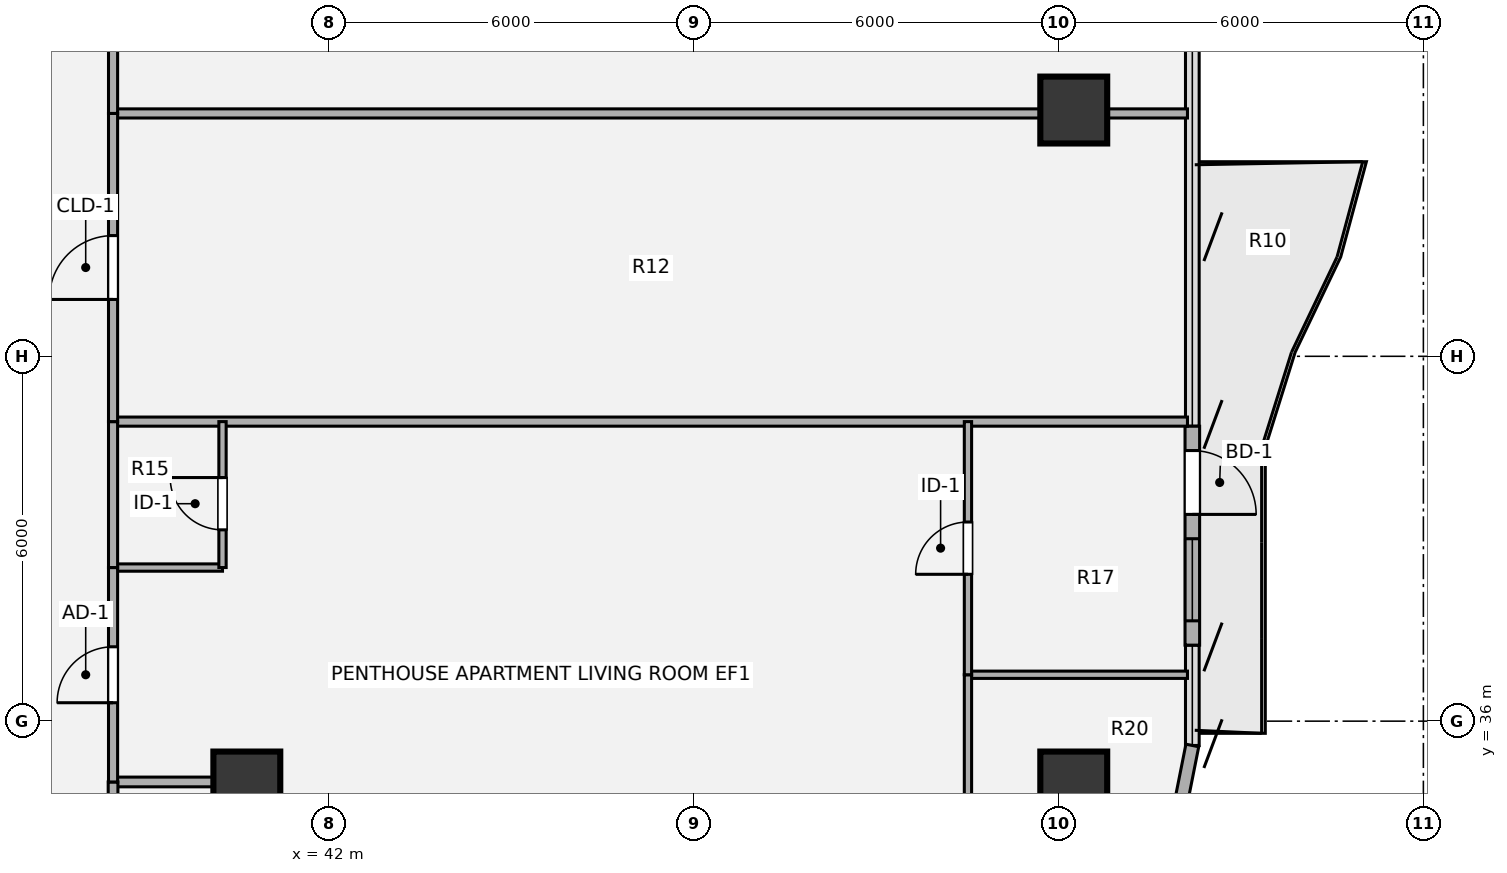
"""IFC4 building model, lengths in metres.
Left out: names, types, materials, properties, quantities, classifications, styles, units other than length and angle.
Written with IfcOpenShell. Run it as: python <this file> out.ifc"""

import sys

from ifc_helpers import new_model, si_unit, direction, frame, frame_2d, origin, origin_2d, place, context, subcontext, project, spatial, rectangle, hollow_circle, extrude, source, transform, mapped, element, fill, save


model = new_model("IFC4")
c1 = context("Model", 3, precision=1e-05, world=origin(), true_north=direction((0.0, 1.0)))
c2 = subcontext(c1, "Body", "Model", "MODEL_VIEW")
j1 = project(units=[si_unit("LENGTHUNIT", "METRE"), si_unit("PLANEANGLEUNIT", "RADIAN")], contexts=[c1])
p1 = place(None, origin())
s1 = spatial("IfcSite", under=j1, at=p1, CompositionType="ELEMENT")
p2 = place(p1, origin())
s2 = spatial("IfcBuilding", under=s1, at=p2, CompositionType="ELEMENT")
p3 = place(p2, frame((0.0, 0.0, 205.56)))
s3 = spatial("IfcBuildingStorey", under=s2, at=p3, CompositionType="ELEMENT", Elevation=205.56)
m1 = source(origin(), c2, "Body", "SweptSolid", [
    extrude(hollow_circle(Radius=0.55, WallThickness=0.04, at=origin_2d()), origin(), (0.0, 0.0, 1.0), 3.78),
])
for number, where, z_axis, x_axis in (
    (1, (54.25, 34.95, 0.0), (0.0, 0.0, 1.0), (1.0, 0.0, 0.0)),
    (2, (54.25, 46.05, 0.0), (0.0, 0.0, 1.0), (1.0, 0.0, 0.0)),
    (3, (40.65, 34.95, 0.0), (0.0, 0.0, 1.0), (1.0, 0.0, 0.0)),
):
    element("IfcColumn", number, at=place(p3, frame(where, z_axis=z_axis, x_axis=x_axis)), inside=s3, PredefinedType="COLUMN", context=c2, shape_type="MappedRepresentation", body=[
        mapped(m1, transform((0.0, 0.0, 0.0), x_axis=(1.0, 0.0, 0.0), y_axis=(0.0, 1.0, 0.0), z_axis=(0.0, 0.0, 1.0), scale=1.0)),
    ])
p4 = place(p3, frame((56.2, 40.85, 0.0), z_axis=(0.0, 0.0, 1.0), x_axis=(0.0, -1.0, 0.0)))
e4 = element("IfcWall", 4, at=p4, inside=s3, PredefinedType="SOLIDWALL", context=c2, shape_type="SweptSolid", body=[
    extrude(rectangle(XDim=3.6, YDim=0.24, at=frame_2d((1.8, 0.0))), origin(), (0.0, 0.0, 1.0), 3.53),
])
p5 = place(p4, frame((0.4, 0.0, 0.0)))
e5 = element("IfcOpeningElement", 5, at=p5, cuts=e4, PredefinedType="OPENING", context=c2, shape_type="SweptSolid", body=[
    extrude(rectangle(XDim=1.05, YDim=2.15, at=origin_2d()), frame((0.525, 0.13, 1.075), z_axis=(0.0, -1.0, 0.0), x_axis=(1.0, 0.0, 0.0)), (0.0, 0.0, 1.0), 0.26),
])
p6 = place(p4, frame((1.85, 0.0, 0.85)))
e6 = element("IfcOpeningElement", 6, at=p6, cuts=e4, PredefinedType="OPENING", context=c2, shape_type="SweptSolid", body=[
    extrude(rectangle(XDim=1.35, YDim=1.35, at=origin_2d()), frame((0.675, 0.13, 0.675), z_axis=(0.0, -1.0, 0.0), x_axis=(1.0, 0.0, 0.0)), (0.0, 0.0, 1.0), 0.26),
])
p7 = place(p3, frame((56.2, 35.6, 0.0), z_axis=(0.0, 0.0, 1.0), x_axis=(-0.195138390419, -0.980775717779, 0.0)))
e7 = element("IfcWall", 7, at=p7, inside=s3, PredefinedType="SOLIDWALL", context=c2, shape_type="SweptSolid", body=[
    extrude(rectangle(XDim=1.249, YDim=0.215, at=frame_2d((0.624, 0.0))), origin(), (0.0, 0.0, 1.0), 3.53),
])
p8 = place(p3, frame((38.45, 35.0, 0.0), z_axis=(0.0, 0.0, 1.0), x_axis=(1.0, 0.0, 0.0)))
e8 = element("IfcWall", 8, at=p8, inside=s3, PredefinedType="PLUMBINGWALL", context=c2, shape_type="SweptSolid", body=[
    extrude(rectangle(XDim=1.8, YDim=0.16, at=frame_2d((0.9, 0.0))), origin(), (0.0, 0.0, 1.0), 2.903),
])
p9 = place(p3, frame((52.51, 36.763, 0.0), z_axis=(0.0, 0.0, 1.0), x_axis=(1.0, 0.0, 0.0)))
e9 = element("IfcWall", 9, at=p9, inside=s3, PredefinedType="PARTITIONING", context=c2, shape_type="SweptSolid", body=[
    extrude(rectangle(XDim=3.61, YDim=0.12, at=frame_2d((1.805, 0.0))), origin(), (0.0, 0.0, 1.0), 2.982),
])
p10 = place(p3, frame((38.45, 38.526, 0.0), z_axis=(0.0, 0.0, 1.0), x_axis=(1.0, 0.0, 0.0)))
e10 = element("IfcWall", 10, at=p10, inside=s3, PredefinedType="PARTITIONING", context=c2, shape_type="SweptSolid", body=[
    extrude(rectangle(XDim=1.8, YDim=0.12, at=frame_2d((0.9, 0.0))), origin(), (0.0, 0.0, 1.0), 3.259),
])
p11 = place(p3, frame((38.45, 40.926, 0.0), z_axis=(0.0, 0.0, 1.0), x_axis=(1.0, 0.0, 0.0)))
e11 = element("IfcWall", 11, at=p11, inside=s3, PredefinedType="PARTITIONING", context=c2, shape_type="SweptSolid", body=[
    extrude(rectangle(XDim=17.67, YDim=0.15, at=frame_2d((8.835, 0.0))), origin(), (0.0, 0.0, 1.0), 2.982),
])
p12 = place(p3, frame((38.45, 45.994, 0.0), z_axis=(0.0, 0.0, 1.0), x_axis=(1.0, 0.0, 0.0)))
e12 = element("IfcWall", 12, at=p12, inside=s3, PredefinedType="PARTITIONING", context=c2, shape_type="SweptSolid", body=[
    extrude(rectangle(XDim=17.67, YDim=0.15, at=frame_2d((8.835, 0.0))), origin(), (0.0, 0.0, 1.0), 2.903),
])
p13 = place(p3, frame((38.45, 32.6, 0.0), z_axis=(0.0, 0.0, 1.0), x_axis=(0.0, 1.0, 0.0)))
e13 = element("IfcWall", 13, at=p13, inside=s3, PredefinedType="PLUMBINGWALL", context=c2, shape_type="SweptSolid", body=[
    extrude(rectangle(XDim=2.4, YDim=0.16, at=frame_2d((1.2, 0.0))), origin(), (0.0, 0.0, 1.0), 3.5),
])
p14 = place(p3, frame((38.45, 35.0, 0.0), z_axis=(0.0, 0.0, 1.0), x_axis=(0.0, 1.0, 0.0)))
e14 = element("IfcWall", 14, at=p14, inside=s3, PredefinedType="PARTITIONING", context=c2, shape_type="SweptSolid", body=[
    extrude(rectangle(XDim=3.526, YDim=0.15, at=frame_2d((1.763, 0.0))), origin(), (0.0, 0.0, 1.0), 3.5),
])
p15 = place(p14, frame((1.303, 0.0, 0.0)))
e15 = element("IfcOpeningElement", 15, at=p15, cuts=e14, PredefinedType="OPENING", context=c2, shape_type="SweptSolid", body=[
    extrude(rectangle(XDim=0.92, YDim=2.1, at=origin_2d()), frame((0.46, 0.085, 1.05), z_axis=(0.0, -1.0, 0.0), x_axis=(1.0, 0.0, 0.0)), (0.0, 0.0, 1.0), 0.17),
])
p16 = place(p3, frame((38.45, 38.526, 0.0), z_axis=(0.0, 0.0, 1.0), x_axis=(0.0, 1.0, 0.0)))
e16 = element("IfcWall", 16, at=p16, inside=s3, PredefinedType="PARTITIONING", context=c2, shape_type="SweptSolid", body=[
    extrude(rectangle(XDim=2.4, YDim=0.15, at=frame_2d((1.2, 0.0))), origin(), (0.0, 0.0, 1.0), 3.5),
])
p17 = place(p3, frame((38.45, 40.926, 0.0), z_axis=(0.0, 0.0, 1.0), x_axis=(0.0, 1.0, 0.0)))
e17 = element("IfcWall", 17, at=p17, inside=s3, PredefinedType="PARTITIONING", context=c2, shape_type="SweptSolid", body=[
    extrude(rectangle(XDim=5.068, YDim=0.15, at=frame_2d((2.534, 0.0))), origin(), (0.0, 0.0, 1.0), 3.5),
])
p18 = place(p17, frame((2.009, 0.0, 0.0)))
e18 = element("IfcOpeningElement", 18, at=p18, cuts=e17, PredefinedType="OPENING", context=c2, shape_type="SweptSolid", body=[
    extrude(rectangle(XDim=1.05, YDim=2.1, at=origin_2d()), frame((0.525, 0.085, 1.05), z_axis=(0.0, -1.0, 0.0), x_axis=(1.0, 0.0, 0.0)), (0.0, 0.0, 1.0), 0.17),
])
p19 = place(p3, frame((38.45, 45.994, 0.0), z_axis=(0.0, 0.0, 1.0), x_axis=(0.0, 1.0, 0.0)))
e19 = element("IfcWall", 19, at=p19, inside=s3, PredefinedType="PARTITIONING", context=c2, shape_type="SweptSolid", body=[
    extrude(rectangle(XDim=4.706, YDim=0.15, at=frame_2d((2.353, 0.0))), origin(), (0.0, 0.0, 1.0), 3.5),
])
p20 = place(p19, frame((1.828, 0.0, 0.0)))
e20 = element("IfcOpeningElement", 20, at=p20, cuts=e19, PredefinedType="OPENING", context=c2, shape_type="SweptSolid", body=[
    extrude(rectangle(XDim=1.05, YDim=2.1, at=origin_2d()), frame((0.525, 0.085, 1.05), z_axis=(0.0, -1.0, 0.0), x_axis=(1.0, 0.0, 0.0)), (0.0, 0.0, 1.0), 0.17),
])
p21 = place(p3, frame((40.25, 32.6, 0.0), z_axis=(0.0, 0.0, 1.0), x_axis=(0.0, 1.0, 0.0)))
e21 = element("IfcWall", 21, at=p21, inside=s3, PredefinedType="PLUMBINGWALL", context=c2, shape_type="SweptSolid", body=[
    extrude(rectangle(XDim=2.4, YDim=0.16, at=frame_2d((1.2, 0.0))), origin(), (0.0, 0.0, 1.0), 3.5),
])
p22 = place(p21, frame((0.2, 0.0, 0.0)))
e22 = element("IfcOpeningElement", 22, at=p22, cuts=e21, PredefinedType="OPENING", context=c2, shape_type="SweptSolid", body=[
    extrude(rectangle(XDim=0.86, YDim=2.1, at=origin_2d()), frame((0.43, 0.09, 1.05), z_axis=(0.0, -1.0, 0.0), x_axis=(1.0, 0.0, 0.0)), (0.0, 0.0, 1.0), 0.18),
])
p23 = place(p3, frame((40.25, 38.526, 0.0), z_axis=(0.0, 0.0, 1.0), x_axis=(0.0, 1.0, 0.0)))
e23 = element("IfcWall", 23, at=p23, inside=s3, PredefinedType="PARTITIONING", context=c2, shape_type="SweptSolid", body=[
    extrude(rectangle(XDim=2.4, YDim=0.12, at=frame_2d((1.2, 0.0))), origin(), (0.0, 0.0, 1.0), 3.5),
])
p24 = place(p23, frame((0.62, 0.0, 0.0)))
e24 = element("IfcOpeningElement", 24, at=p24, cuts=e23, PredefinedType="OPENING", context=c2, shape_type="SweptSolid", body=[
    extrude(rectangle(XDim=0.86, YDim=2.1, at=origin_2d()), frame((0.43, 0.07, 1.05), z_axis=(0.0, -1.0, 0.0), x_axis=(1.0, 0.0, 0.0)), (0.0, 0.0, 1.0), 0.14),
])
p25 = place(p3, frame((52.51, 32.48, 0.0), z_axis=(0.0, 0.0, 1.0), x_axis=(0.0, 1.0, 0.0)))
e25 = element("IfcWall", 25, at=p25, inside=s3, PredefinedType="PARTITIONING", context=c2, shape_type="SweptSolid", body=[
    extrude(rectangle(XDim=4.283, YDim=0.12, at=frame_2d((2.142, 0.0))), origin(), (0.0, 0.0, 1.0), 3.5),
])
p26 = place(p25, frame((0.432, 0.0, 0.0)))
e26 = element("IfcOpeningElement", 26, at=p26, cuts=e25, PredefinedType="OPENING", context=c2, shape_type="SweptSolid", body=[
    extrude(rectangle(XDim=0.86, YDim=2.1, at=origin_2d()), frame((0.43, 0.07, 1.05), z_axis=(0.0, -1.0, 0.0), x_axis=(1.0, 0.0, 0.0)), (0.0, 0.0, 1.0), 0.14),
])
p27 = place(p3, frame((52.51, 36.763, 0.0), z_axis=(0.0, 0.0, 1.0), x_axis=(0.0, 1.0, 0.0)))
e27 = element("IfcWall", 27, at=p27, inside=s3, PredefinedType="PARTITIONING", context=c2, shape_type="SweptSolid", body=[
    extrude(rectangle(XDim=4.163, YDim=0.12, at=frame_2d((2.082, 0.0))), origin(), (0.0, 0.0, 1.0), 3.5),
])
p28 = place(p27, frame((1.652, 0.0, 0.0)))
e28 = element("IfcOpeningElement", 28, at=p28, cuts=e27, PredefinedType="OPENING", context=c2, shape_type="SweptSolid", body=[
    extrude(rectangle(XDim=0.86, YDim=2.1, at=origin_2d()), frame((0.43, 0.07, 1.05), z_axis=(0.0, -1.0, 0.0), x_axis=(1.0, 0.0, 0.0)), (0.0, 0.0, 1.0), 0.14),
])
m2 = source(origin(), c2, "Body", "SweptSolid", [
    extrude(rectangle(XDim=1.05, YDim=2.15, at=origin_2d()), frame((0.525, 0.025, 1.075), z_axis=(0.0, -1.0, 0.0), x_axis=(1.0, 0.0, 0.0)), (0.0, 0.0, 1.0), 0.05),
])
p29 = place(p5, origin())
e29 = element("IfcDoor", 29, at=p29, inside=s3, OperationType="SINGLE_SWING_RIGHT", PredefinedType="DOOR", context=c2, shape_type="MappedRepresentation", body=[
    mapped(m2, transform((0.0, 0.0, 0.0), x_axis=(1.0, 0.0, 0.0), y_axis=(0.0, 1.0, 0.0), z_axis=(0.0, 0.0, 1.0), scale=1.0)),
])
fill(e5, e29)
m3 = source(origin(), c2, "Body", "SweptSolid", [
    extrude(rectangle(XDim=1.35, YDim=1.35, at=origin_2d()), frame((0.675, 0.03, 0.675), z_axis=(0.0, -1.0, 0.0), x_axis=(1.0, 0.0, 0.0)), (0.0, 0.0, 1.0), 0.06),
])
p30 = place(p6, origin())
e30 = element("IfcWindow", 30, at=p30, inside=s3, PartitioningType="SINGLE_PANEL", PredefinedType="WINDOW", context=c2, shape_type="MappedRepresentation", body=[
    mapped(m3, transform((0.0, 0.0, 0.0), x_axis=(1.0, 0.0, 0.0), y_axis=(0.0, 1.0, 0.0), z_axis=(0.0, 0.0, 1.0), scale=1.0)),
])
fill(e6, e30)
m4 = source(origin(), c2, "Body", "SweptSolid", [
    extrude(rectangle(XDim=0.92, YDim=2.1, at=origin_2d()), frame((0.46, 0.025, 1.05), z_axis=(0.0, -1.0, 0.0), x_axis=(1.0, 0.0, 0.0)), (0.0, 0.0, 1.0), 0.05),
])
p31 = place(p15, origin())
e31 = element("IfcDoor", 31, at=p31, inside=s3, OperationType="SINGLE_SWING_LEFT", PredefinedType="DOOR", context=c2, shape_type="MappedRepresentation", body=[
    mapped(m4, transform((0.0, 0.0, 0.0), x_axis=(1.0, 0.0, 0.0), y_axis=(0.0, 1.0, 0.0), z_axis=(0.0, 0.0, 1.0), scale=1.0)),
])
fill(e15, e31)
m5 = source(origin(), c2, "Body", "SweptSolid", [
    extrude(rectangle(XDim=1.05, YDim=2.1, at=origin_2d()), frame((0.525, 0.025, 1.05), z_axis=(0.0, -1.0, 0.0), x_axis=(1.0, 0.0, 0.0)), (0.0, 0.0, 1.0), 0.05),
])
p32 = place(p18, origin())
e32 = element("IfcDoor", 32, at=p32, inside=s3, OperationType="SINGLE_SWING_LEFT", PredefinedType="DOOR", context=c2, shape_type="MappedRepresentation", body=[
    mapped(m5, transform((0.0, 0.0, 0.0), x_axis=(1.0, 0.0, 0.0), y_axis=(0.0, 1.0, 0.0), z_axis=(0.0, 0.0, 1.0), scale=1.0)),
])
fill(e18, e32)
m6 = source(origin(), c2, "Body", "SweptSolid", [
    extrude(rectangle(XDim=0.86, YDim=2.1, at=origin_2d()), frame((0.43, 0.025, 1.05), z_axis=(0.0, -1.0, 0.0), x_axis=(1.0, 0.0, 0.0)), (0.0, 0.0, 1.0), 0.05),
])
p33 = place(p24, origin())
e33 = element("IfcDoor", 33, at=p33, inside=s3, OperationType="SINGLE_SWING_RIGHT", PredefinedType="DOOR", context=c2, shape_type="MappedRepresentation", body=[
    mapped(m6, transform((0.0, 0.0, 0.0), x_axis=(1.0, 0.0, 0.0), y_axis=(0.0, 1.0, 0.0), z_axis=(0.0, 0.0, 1.0), scale=1.0)),
])
fill(e24, e33)
p34 = place(p28, origin())
e34 = element("IfcDoor", 34, at=p34, inside=s3, OperationType="SINGLE_SWING_LEFT", PredefinedType="DOOR", context=c2, shape_type="MappedRepresentation", body=[
    mapped(m6, transform((0.0, 0.0, 0.0), x_axis=(1.0, 0.0, 0.0), y_axis=(0.0, 1.0, 0.0), z_axis=(0.0, 0.0, 1.0), scale=1.0)),
])
fill(e28, e34)
save(model, sys.argv[1])
